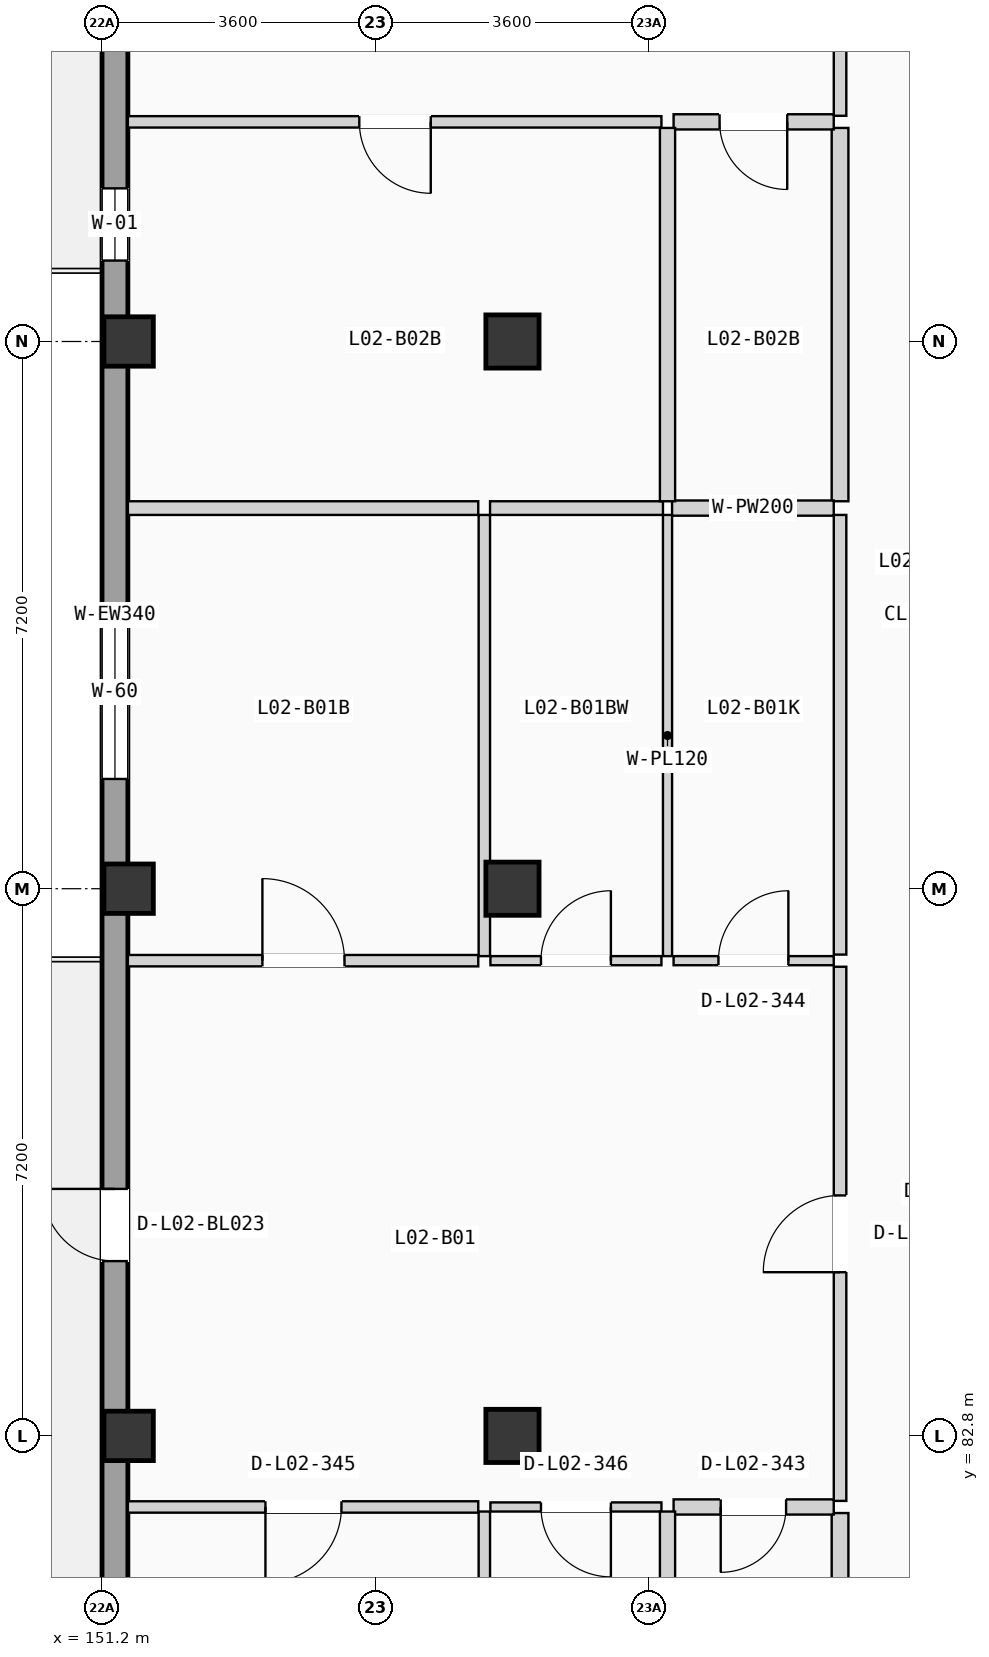
"""IFC4 building model, lengths in metres.
Left out: names, types, materials, properties, quantities, classifications, styles, units other than length and angle.
Written with IfcOpenShell. Run it as: python <this file> out.ifc"""

import sys

from ifc_helpers import new_model, si_unit, direction, frame, frame_2d, origin, origin_2d, place, context, subcontext, project, spatial, rectangle, extrude, element, fill, save


model = new_model("IFC4")
c1 = context("Model", 3, precision=1e-05, world=origin(), true_north=direction((0.0, 1.0)))
c2 = subcontext(c1, "Body", "Model", "MODEL_VIEW")
j1 = project(units=[si_unit("LENGTHUNIT", "METRE"), si_unit("PLANEANGLEUNIT", "RADIAN")], contexts=[c1])
p1 = place(None, origin())
s1 = spatial("IfcSite", under=j1, at=p1, CompositionType="ELEMENT")
p2 = place(p1, origin())
s2 = spatial("IfcBuilding", under=s1, at=p2, CompositionType="ELEMENT")
p3 = place(p2, frame((0.0, 0.0, 8.575)))
s3 = spatial("IfcBuildingStorey", under=s2, at=p3, CompositionType="ELEMENT", Elevation=8.575)
for number, where, z_axis, x_axis in (
    (1, (151.55, 82.8, 0.0), (0.0, 0.0, 1.0), (1.0, 0.0, 0.0)),
    (2, (151.55, 90.0, 0.0), (0.0, 0.0, 1.0), (1.0, 0.0, 0.0)),
    (3, (151.55, 97.2, 0.0), (0.0, 0.0, 1.0), (1.0, 0.0, 0.0)),
):
    element("IfcColumn", number, at=place(p3, frame(where, z_axis=z_axis, x_axis=x_axis)), inside=s3, PredefinedType="COLUMN", context=c2, shape_type="SweptSolid", body=[
        extrude(rectangle(XDim=0.65, YDim=0.65, at=origin_2d()), origin(), (0.0, 0.0, 1.0), 3.5),
    ])
for number, where, z_axis, x_axis in (
    (4, (156.6, 82.8, 0.0), (0.0, 0.0, 1.0), (1.0, 0.0, 0.0)),
    (5, (156.6, 90.0, 0.0), (0.0, 0.0, 1.0), (1.0, 0.0, 0.0)),
    (6, (156.6, 97.2, 0.0), (0.0, 0.0, 1.0), (1.0, 0.0, 0.0)),
):
    element("IfcColumn", number, at=place(p3, frame(where, z_axis=z_axis, x_axis=x_axis)), inside=s3, PredefinedType="COLUMN", context=c2, shape_type="SweptSolid", body=[
        extrude(rectangle(XDim=0.7, YDim=0.7, at=origin_2d()), origin(), (0.0, 0.0, 1.0), 3.5),
    ])
p4 = place(p3, frame((151.37, 68.74, 0.0), z_axis=(0.0, 0.0, 1.0), x_axis=(0.0, 1.0, 0.0)))
e7 = element("IfcWall", 7, at=p4, inside=s3, PredefinedType="SOLIDWALL", context=c2, shape_type="SweptSolid", body=[
    extrude(rectangle(XDim=49.72, YDim=0.34, at=frame_2d((24.86, 0.0))), origin(), (0.0, 0.0, 1.0), 3.24),
])
p5 = place(p4, frame((16.36, 0.0, 0.0)))
e8 = element("IfcOpeningElement", 8, at=p5, cuts=e7, PredefinedType="OPENING", context=c2, shape_type="SweptSolid", body=[
    extrude(rectangle(XDim=0.95, YDim=2.15, at=frame_2d((0.475, 1.075))), frame((0.0, 0.18, 0.0), z_axis=(0.0, -1.0, 0.0), x_axis=(1.0, 0.0, 0.0)), (0.0, 0.0, 1.0), 0.36),
])
p6 = place(p4, frame((9.002, 0.0, 0.9)))
e9 = element("IfcOpeningElement", 9, at=p6, cuts=e7, PredefinedType="OPENING", context=c2, shape_type="SweptSolid", body=[
    extrude(rectangle(XDim=2.3, YDim=1.65, at=frame_2d((1.15, 0.825))), frame((0.0, 0.18, 0.0), z_axis=(0.0, -1.0, 0.0), x_axis=(1.0, 0.0, 0.0)), (0.0, 0.0, 1.0), 0.36),
])
p7 = place(p4, frame((22.704, 0.0, 0.755)))
e10 = element("IfcOpeningElement", 10, at=p7, cuts=e7, PredefinedType="OPENING", context=c2, shape_type="SweptSolid", body=[
    extrude(rectangle(XDim=2.3, YDim=1.8, at=frame_2d((1.15, 0.9))), frame((0.0, 0.18, 0.0), z_axis=(0.0, -1.0, 0.0), x_axis=(1.0, 0.0, 0.0)), (0.0, 0.0, 1.0), 0.36),
])
p8 = place(p4, frame((32.455, 0.0, 0.0)))
e11 = element("IfcOpeningElement", 11, at=p8, cuts=e7, PredefinedType="OPENING", context=c2, shape_type="SweptSolid", body=[
    extrude(rectangle(XDim=1.08, YDim=2.18, at=frame_2d((0.54, 1.09))), frame((0.0, 0.18, 0.0), z_axis=(0.0, -1.0, 0.0), x_axis=(1.0, 0.0, 0.0)), (0.0, 0.0, 1.0), 0.36),
])
p9 = place(p4, frame((29.525, 0.0, 0.9)))
e12 = element("IfcOpeningElement", 12, at=p9, cuts=e7, PredefinedType="OPENING", context=c2, shape_type="SweptSolid", body=[
    extrude(rectangle(XDim=0.95, YDim=1.2, at=frame_2d((0.475, 0.6))), frame((0.0, 0.18, 0.0), z_axis=(0.0, -1.0, 0.0), x_axis=(1.0, 0.0, 0.0)), (0.0, 0.0, 1.0), 0.36),
])
p10 = place(p4, frame((39.529, 0.0, 0.9)))
e13 = element("IfcOpeningElement", 13, at=p10, cuts=e7, PredefinedType="OPENING", context=c2, shape_type="SweptSolid", body=[
    extrude(rectangle(XDim=0.95, YDim=1.35, at=frame_2d((0.475, 0.675))), frame((0.0, 0.18, 0.0), z_axis=(0.0, -1.0, 0.0), x_axis=(1.0, 0.0, 0.0)), (0.0, 0.0, 1.0), 0.36),
])
p11 = place(p3, frame((160.91, 81.945, 0.0), z_axis=(0.0, 0.0, 1.0), x_axis=(0.0, 1.0, 0.0)))
e14 = element("IfcWall", 14, at=p11, inside=s3, PredefinedType="PARTITIONING", context=c2, shape_type="SweptSolid", body=[
    extrude(rectangle(XDim=7.028, YDim=0.165, at=frame_2d((3.514, 0.0))), origin(), (0.0, 0.0, 1.0), 3.22),
])
p12 = place(p11, frame((3.009, 0.0, 0.0)))
e15 = element("IfcOpeningElement", 15, at=p12, cuts=e14, PredefinedType="OPENING", context=c2, shape_type="SweptSolid", body=[
    extrude(rectangle(XDim=1.01, YDim=2.11, at=frame_2d((0.505, 1.055))), frame((0.0, 0.093, 0.0), z_axis=(0.0, -1.0, 0.0), x_axis=(1.0, 0.0, 0.0)), (0.0, 0.0, 1.0), 0.185),
])
p13 = place(p3, frame((160.91, 76.0, 0.0), z_axis=(0.0, 0.0, 1.0), x_axis=(0.0, 1.0, 0.0)))
e16 = element("IfcWall", 16, at=p13, inside=s3, PredefinedType="PLUMBINGWALL", context=c2, shape_type="SweptSolid", body=[
    extrude(rectangle(XDim=5.785, YDim=0.22, at=frame_2d((2.893, 0.0))), origin(), (0.0, 0.0, 1.0), 3.22),
])
p14 = place(p3, frame((160.91, 89.133, 0.0), z_axis=(0.0, 0.0, 1.0), x_axis=(0.0, 1.0, 0.0)))
e17 = element("IfcWall", 17, at=p14, inside=s3, PredefinedType="PARTITIONING", context=c2, shape_type="SweptSolid", body=[
    extrude(rectangle(XDim=5.785, YDim=0.165, at=frame_2d((2.893, 0.0))), origin(), (0.0, 0.0, 1.0), 3.22),
])
p15 = place(p3, frame((160.91, 100.17, 0.0), z_axis=(0.0, 0.0, 1.0), x_axis=(0.0, 1.0, 0.0)))
e18 = element("IfcWall", 18, at=p15, inside=s3, PredefinedType="PARTITIONING", context=c2, shape_type="SweptSolid", body=[
    extrude(rectangle(XDim=5.958, YDim=0.165, at=frame_2d((2.979, 0.0))), origin(), (0.0, 0.0, 1.0), 3.22),
])
p16 = place(p15, frame((2.474, 0.0, 0.0)))
e19 = element("IfcOpeningElement", 19, at=p16, cuts=e18, PredefinedType="OPENING", context=c2, shape_type="SweptSolid", body=[
    extrude(rectangle(XDim=1.01, YDim=2.11, at=frame_2d((0.505, 1.055))), frame((0.0, 0.093, 0.0), z_axis=(0.0, -1.0, 0.0), x_axis=(1.0, 0.0, 0.0)), (0.0, 0.0, 1.0), 0.185),
])
p17 = place(p3, frame((160.91, 95.098, 0.0), z_axis=(0.0, 0.0, 1.0), x_axis=(0.0, 1.0, 0.0)))
e20 = element("IfcWall", 20, at=p17, inside=s3, PredefinedType="PLUMBINGWALL", context=c2, shape_type="SweptSolid", body=[
    extrude(rectangle(XDim=4.912, YDim=0.22, at=frame_2d((2.456, 0.0))), origin(), (0.0, 0.0, 1.0), 3.22),
])
p18 = place(p3, frame((158.72, 81.865, 0.0), z_axis=(0.0, 0.0, 1.0), x_axis=(1.0, 0.0, 0.0)))
e21 = element("IfcWall", 21, at=p18, inside=s3, PredefinedType="PLUMBINGWALL", context=c2, shape_type="SweptSolid", body=[
    extrude(rectangle(XDim=2.107, YDim=0.2, at=frame_2d((1.053, 0.0))), origin(), (0.0, 0.0, 1.0), 3.22),
])
p19 = place(p18, frame((0.62, 0.0, 0.0)))
e22 = element("IfcOpeningElement", 22, at=p19, cuts=e21, PredefinedType="OPENING", context=c2, shape_type="SweptSolid", body=[
    extrude(rectangle(XDim=0.86, YDim=2.0, at=frame_2d((0.43, 1.0))), frame((0.0, 0.11, 0.0), z_axis=(0.0, -1.0, 0.0), x_axis=(1.0, 0.0, 0.0)), (0.0, 0.0, 1.0), 0.22),
])
p20 = place(p3, frame((158.72, 89.053, 0.0), z_axis=(0.0, 0.0, 1.0), x_axis=(1.0, 0.0, 0.0)))
e23 = element("IfcWall", 23, at=p20, inside=s3, PredefinedType="PARTITIONING", context=c2, shape_type="SweptSolid", body=[
    extrude(rectangle(XDim=2.107, YDim=0.12, at=frame_2d((1.053, 0.0))), origin(), (0.0, 0.0, 1.0), 3.22),
])
p21 = place(p20, frame((0.59, 0.0, 0.0)))
e24 = element("IfcOpeningElement", 24, at=p21, cuts=e23, PredefinedType="OPENING", context=c2, shape_type="SweptSolid", body=[
    extrude(rectangle(XDim=0.92, YDim=2.02, at=frame_2d((0.46, 1.01))), frame((0.0, 0.07, 0.0), z_axis=(0.0, -1.0, 0.0), x_axis=(1.0, 0.0, 0.0)), (0.0, 0.0, 1.0), 0.14),
])
p22 = place(p3, frame((151.54, 81.865, 0.0), z_axis=(0.0, 0.0, 1.0), x_axis=(1.0, 0.0, 0.0)))
e25 = element("IfcWall", 25, at=p22, inside=s3, PredefinedType="PARTITIONING", context=c2, shape_type="SweptSolid", body=[
    extrude(rectangle(XDim=4.61, YDim=0.15, at=frame_2d((2.305, 0.0))), origin(), (0.0, 0.0, 1.0), 3.22),
])
p23 = place(p22, frame((1.81, 0.0, 0.0)))
e26 = element("IfcOpeningElement", 26, at=p23, cuts=e25, PredefinedType="OPENING", context=c2, shape_type="SweptSolid", body=[
    extrude(rectangle(XDim=1.0, YDim=2.06, at=frame_2d((0.5, 1.03))), frame((0.0, 0.085, 0.0), z_axis=(0.0, -1.0, 0.0), x_axis=(1.0, 0.0, 0.0)), (0.0, 0.0, 1.0), 0.17),
])
p24 = place(p3, frame((156.31, 81.865, 0.0), z_axis=(0.0, 0.0, 1.0), x_axis=(1.0, 0.0, 0.0)))
e27 = element("IfcWall", 27, at=p24, inside=s3, PredefinedType="PARTITIONING", context=c2, shape_type="SweptSolid", body=[
    extrude(rectangle(XDim=2.25, YDim=0.12, at=frame_2d((1.125, 0.0))), origin(), (0.0, 0.0, 1.0), 3.22),
])
p25 = place(p24, frame((0.665, 0.0, 0.0)))
e28 = element("IfcOpeningElement", 28, at=p25, cuts=e27, PredefinedType="OPENING", context=c2, shape_type="SweptSolid", body=[
    extrude(rectangle(XDim=0.92, YDim=2.02, at=frame_2d((0.46, 1.01))), frame((0.0, 0.07, 0.0), z_axis=(0.0, -1.0, 0.0), x_axis=(1.0, 0.0, 0.0)), (0.0, 0.0, 1.0), 0.14),
])
p26 = place(p3, frame((151.54, 89.053, 0.0), z_axis=(0.0, 0.0, 1.0), x_axis=(1.0, 0.0, 0.0)))
e29 = element("IfcWall", 29, at=p26, inside=s3, PredefinedType="PARTITIONING", context=c2, shape_type="SweptSolid", body=[
    extrude(rectangle(XDim=4.61, YDim=0.15, at=frame_2d((2.305, 0.0))), origin(), (0.0, 0.0, 1.0), 3.22),
])
p27 = place(p26, frame((1.77, 0.0, 0.0)))
e30 = element("IfcOpeningElement", 30, at=p27, cuts=e29, PredefinedType="OPENING", context=c2, shape_type="SweptSolid", body=[
    extrude(rectangle(XDim=1.08, YDim=2.1, at=frame_2d((0.54, 1.05))), frame((0.0, 0.085, 0.0), z_axis=(0.0, -1.0, 0.0), x_axis=(1.0, 0.0, 0.0)), (0.0, 0.0, 1.0), 0.17),
])
p28 = place(p3, frame((156.31, 89.053, 0.0), z_axis=(0.0, 0.0, 1.0), x_axis=(1.0, 0.0, 0.0)))
e31 = element("IfcWall", 31, at=p28, inside=s3, PredefinedType="PARTITIONING", context=c2, shape_type="SweptSolid", body=[
    extrude(rectangle(XDim=2.25, YDim=0.12, at=frame_2d((1.125, 0.0))), origin(), (0.0, 0.0, 1.0), 3.22),
])
p29 = place(p28, frame((0.665, 0.0, 0.0)))
e32 = element("IfcOpeningElement", 32, at=p29, cuts=e31, PredefinedType="OPENING", context=c2, shape_type="SweptSolid", body=[
    extrude(rectangle(XDim=0.92, YDim=2.02, at=frame_2d((0.46, 1.01))), frame((0.0, 0.07, 0.0), z_axis=(0.0, -1.0, 0.0), x_axis=(1.0, 0.0, 0.0)), (0.0, 0.0, 1.0), 0.14),
])
p30 = place(p3, frame((158.64, 76.0, 0.0), z_axis=(0.0, 0.0, 1.0), x_axis=(0.0, 1.0, 0.0)))
e33 = element("IfcWall", 33, at=p30, inside=s3, PredefinedType="PLUMBINGWALL", context=c2, shape_type="SweptSolid", body=[
    extrude(rectangle(XDim=5.805, YDim=0.2, at=frame_2d((2.902, 0.0))), origin(), (0.0, 0.0, 1.0), 3.22),
])
p31 = place(p30, frame((2.467, 0.0, 0.0)))
e34 = element("IfcOpeningElement", 34, at=p31, cuts=e33, PredefinedType="OPENING", context=c2, shape_type="SweptSolid", body=[
    extrude(rectangle(XDim=0.85, YDim=2.01, at=frame_2d((0.425, 1.005))), frame((0.0, 0.11, 0.0), z_axis=(0.0, -1.0, 0.0), x_axis=(1.0, 0.0, 0.0)), (0.0, 0.0, 1.0), 0.22),
])
p32 = place(p3, frame((158.64, 89.113, 0.0), z_axis=(0.0, 0.0, 1.0), x_axis=(0.0, 1.0, 0.0)))
e35 = element("IfcWall", 35, at=p32, inside=s3, PredefinedType="PARTITIONING", context=c2, shape_type="SweptSolid", body=[
    extrude(rectangle(XDim=5.805, YDim=0.12, at=frame_2d((2.902, 0.0))), origin(), (0.0, 0.0, 1.0), 3.22),
])
p33 = place(p3, frame((158.7, 95.008, 0.0), z_axis=(0.0, 0.0, 1.0), x_axis=(1.0, 0.0, 0.0)))
e36 = element("IfcWall", 36, at=p33, inside=s3, PredefinedType="PLUMBINGWALL", context=c2, shape_type="SweptSolid", body=[
    extrude(rectangle(XDim=2.127, YDim=0.2, at=frame_2d((1.063, 0.0))), origin(), (0.0, 0.0, 1.0), 3.22),
])
for number, where, z_axis, x_axis in (
    (37, (156.23, 76.0, 0.0), (0.0, 0.0, 1.0), (0.0, 1.0, 0.0)),
    (38, (156.23, 89.113, 0.0), (0.0, 0.0, 1.0), (0.0, 1.0, 0.0)),
):
    element("IfcWall", number, at=place(p3, frame(where, z_axis=z_axis, x_axis=x_axis)), inside=s3, PredefinedType="PARTITIONING", context=c2, shape_type="SweptSolid", body=[
        extrude(rectangle(XDim=5.805, YDim=0.15, at=frame_2d((2.902, 0.0))), origin(), (0.0, 0.0, 1.0), 3.22),
    ])
p34 = place(p3, frame((151.54, 95.008, 0.0), z_axis=(0.0, 0.0, 1.0), x_axis=(1.0, 0.0, 0.0)))
e39 = element("IfcWall", 39, at=p34, inside=s3, PredefinedType="PARTITIONING", context=c2, shape_type="SweptSolid", body=[
    extrude(rectangle(XDim=4.61, YDim=0.18, at=frame_2d((2.305, 0.0))), origin(), (0.0, 0.0, 1.0), 3.22),
])
p35 = place(p3, frame((156.305, 95.008, 0.0), z_axis=(0.0, 0.0, 1.0), x_axis=(1.0, 0.0, 0.0)))
e40 = element("IfcWall", 40, at=p35, inside=s3, PredefinedType="PARTITIONING", context=c2, shape_type="SweptSolid", body=[
    extrude(rectangle(XDim=2.275, YDim=0.18, at=frame_2d((1.138, 0.0))), origin(), (0.0, 0.0, 1.0), 3.22),
])
p36 = place(p3, frame((158.72, 100.09, 0.0), z_axis=(0.0, 0.0, 1.0), x_axis=(1.0, 0.0, 0.0)))
e41 = element("IfcWall", 41, at=p36, inside=s3, PredefinedType="PLUMBINGWALL", context=c2, shape_type="SweptSolid", body=[
    extrude(rectangle(XDim=2.107, YDim=0.2, at=frame_2d((1.053, 0.0))), origin(), (0.0, 0.0, 1.0), 3.22),
])
p37 = place(p36, frame((0.605, 0.0, 0.0)))
e42 = element("IfcOpeningElement", 42, at=p37, cuts=e41, PredefinedType="OPENING", context=c2, shape_type="SweptSolid", body=[
    extrude(rectangle(XDim=0.89, YDim=2.03, at=frame_2d((0.445, 1.015))), frame((0.0, 0.11, 0.0), z_axis=(0.0, -1.0, 0.0), x_axis=(1.0, 0.0, 0.0)), (0.0, 0.0, 1.0), 0.22),
])
p38 = place(p3, frame((151.54, 100.09, 0.0), z_axis=(0.0, 0.0, 1.0), x_axis=(1.0, 0.0, 0.0)))
e43 = element("IfcWall", 43, at=p38, inside=s3, PredefinedType="PARTITIONING", context=c2, shape_type="SweptSolid", body=[
    extrude(rectangle(XDim=7.02, YDim=0.15, at=frame_2d((3.51, 0.0))), origin(), (0.0, 0.0, 1.0), 3.22),
])
p39 = place(p38, frame((3.045, 0.0, 0.0)))
e44 = element("IfcOpeningElement", 44, at=p39, cuts=e43, PredefinedType="OPENING", context=c2, shape_type="SweptSolid", body=[
    extrude(rectangle(XDim=0.94, YDim=2.06, at=frame_2d((0.47, 1.03))), frame((0.0, 0.085, 0.0), z_axis=(0.0, -1.0, 0.0), x_axis=(1.0, 0.0, 0.0)), (0.0, 0.0, 1.0), 0.17),
])
p40 = place(p3, frame((158.64, 95.098, 0.0), z_axis=(0.0, 0.0, 1.0), x_axis=(0.0, 1.0, 0.0)))
e45 = element("IfcWall", 45, at=p40, inside=s3, PredefinedType="PLUMBINGWALL", context=c2, shape_type="SweptSolid", body=[
    extrude(rectangle(XDim=4.912, YDim=0.2, at=frame_2d((2.456, 0.0))), origin(), (0.0, 0.0, 1.0), 3.22),
])
p41 = place(p5, origin())
e46 = element("IfcDoor", 46, at=p41, inside=s3, OperationType="SINGLE_SWING_RIGHT", PredefinedType="DOOR", context=c2, shape_type="SweptSolid", body=[
    extrude(rectangle(XDim=0.95, YDim=2.15, at=frame_2d((0.475, 1.075))), frame((0.0, 0.025, 0.0), z_axis=(0.0, -1.0, 0.0), x_axis=(1.0, 0.0, 0.0)), (0.0, 0.0, 1.0), 0.05),
])
fill(e8, e46)
p42 = place(p7, origin())
e47 = element("IfcWindow", 47, at=p42, inside=s3, PartitioningType="DOUBLE_PANEL_VERTICAL", PredefinedType="WINDOW", context=c2, shape_type="SweptSolid", body=[
    extrude(rectangle(XDim=2.3, YDim=1.8, at=frame_2d((1.15, 0.9))), frame((0.0, 0.03, 0.0), z_axis=(0.0, -1.0, 0.0), x_axis=(1.0, 0.0, 0.0)), (0.0, 0.0, 1.0), 0.06),
])
fill(e10, e47)
p43 = place(p9, origin())
e48 = element("IfcWindow", 48, at=p43, inside=s3, PartitioningType="SINGLE_PANEL", PredefinedType="WINDOW", context=c2, shape_type="SweptSolid", body=[
    extrude(rectangle(XDim=0.95, YDim=1.2, at=frame_2d((0.475, 0.6))), frame((0.0, 0.03, 0.0), z_axis=(0.0, -1.0, 0.0), x_axis=(1.0, 0.0, 0.0)), (0.0, 0.0, 1.0), 0.06),
])
fill(e12, e48)
p44 = place(p12, origin())
e49 = element("IfcDoor", 49, at=p44, inside=s3, OperationType="SINGLE_SWING_LEFT", PredefinedType="DOOR", context=c2, shape_type="SweptSolid", body=[
    extrude(rectangle(XDim=1.01, YDim=2.11, at=frame_2d((0.505, 1.055))), frame((0.0, 0.025, 0.0), z_axis=(0.0, -1.0, 0.0), x_axis=(1.0, 0.0, 0.0)), (0.0, 0.0, 1.0), 0.05),
])
fill(e15, e49)
p45 = place(p19, frame((0.86, 0.0, 0.0), z_axis=(0.0, 0.0, 1.0), x_axis=(-1.0, 0.0, 0.0)))
e50 = element("IfcDoor", 50, at=p45, inside=s3, OperationType="SINGLE_SWING_LEFT", PredefinedType="DOOR", context=c2, shape_type="SweptSolid", body=[
    extrude(rectangle(XDim=0.86, YDim=2.0, at=frame_2d((0.43, 1.0))), frame((0.0, 0.025, 0.0), z_axis=(0.0, -1.0, 0.0), x_axis=(1.0, 0.0, 0.0)), (0.0, 0.0, 1.0), 0.05),
])
fill(e22, e50)
p46 = place(p21, origin())
e51 = element("IfcDoor", 51, at=p46, inside=s3, OperationType="SINGLE_SWING_RIGHT", PredefinedType="DOOR", context=c2, shape_type="SweptSolid", body=[
    extrude(rectangle(XDim=0.92, YDim=2.02, at=frame_2d((0.46, 1.01))), frame((0.0, 0.025, 0.0), z_axis=(0.0, -1.0, 0.0), x_axis=(1.0, 0.0, 0.0)), (0.0, 0.0, 1.0), 0.05),
])
fill(e24, e51)
p47 = place(p23, frame((1.0, 0.0, 0.0), z_axis=(0.0, 0.0, 1.0), x_axis=(-1.0, 0.0, 0.0)))
e52 = element("IfcDoor", 52, at=p47, inside=s3, OperationType="SINGLE_SWING_LEFT", PredefinedType="DOOR", context=c2, shape_type="SweptSolid", body=[
    extrude(rectangle(XDim=1.0, YDim=2.06, at=frame_2d((0.5, 1.03))), frame((0.0, 0.025, 0.0), z_axis=(0.0, -1.0, 0.0), x_axis=(1.0, 0.0, 0.0)), (0.0, 0.0, 1.0), 0.05),
])
fill(e26, e52)
p48 = place(p25, frame((0.92, 0.0, 0.0), z_axis=(0.0, 0.0, 1.0), x_axis=(-1.0, 0.0, 0.0)))
e53 = element("IfcDoor", 53, at=p48, inside=s3, OperationType="SINGLE_SWING_RIGHT", PredefinedType="DOOR", context=c2, shape_type="SweptSolid", body=[
    extrude(rectangle(XDim=0.92, YDim=2.02, at=frame_2d((0.46, 1.01))), frame((0.0, 0.025, 0.0), z_axis=(0.0, -1.0, 0.0), x_axis=(1.0, 0.0, 0.0)), (0.0, 0.0, 1.0), 0.05),
])
fill(e28, e53)
p49 = place(p27, origin())
e54 = element("IfcDoor", 54, at=p49, inside=s3, OperationType="SINGLE_SWING_LEFT", PredefinedType="DOOR", context=c2, shape_type="SweptSolid", body=[
    extrude(rectangle(XDim=1.08, YDim=2.1, at=frame_2d((0.54, 1.05))), frame((0.0, 0.025, 0.0), z_axis=(0.0, -1.0, 0.0), x_axis=(1.0, 0.0, 0.0)), (0.0, 0.0, 1.0), 0.05),
])
fill(e30, e54)
p50 = place(p29, origin())
e55 = element("IfcDoor", 55, at=p50, inside=s3, OperationType="SINGLE_SWING_RIGHT", PredefinedType="DOOR", context=c2, shape_type="SweptSolid", body=[
    extrude(rectangle(XDim=0.92, YDim=2.02, at=frame_2d((0.46, 1.01))), frame((0.0, 0.025, 0.0), z_axis=(0.0, -1.0, 0.0), x_axis=(1.0, 0.0, 0.0)), (0.0, 0.0, 1.0), 0.05),
])
fill(e32, e55)
p51 = place(p37, frame((0.89, 0.0, 0.0), z_axis=(0.0, 0.0, 1.0), x_axis=(-1.0, 0.0, 0.0)))
e56 = element("IfcDoor", 56, at=p51, inside=s3, OperationType="SINGLE_SWING_RIGHT", PredefinedType="DOOR", context=c2, shape_type="SweptSolid", body=[
    extrude(rectangle(XDim=0.89, YDim=2.03, at=frame_2d((0.445, 1.015))), frame((0.0, 0.025, 0.0), z_axis=(0.0, -1.0, 0.0), x_axis=(1.0, 0.0, 0.0)), (0.0, 0.0, 1.0), 0.05),
])
fill(e42, e56)
p52 = place(p39, frame((0.94, 0.0, 0.0), z_axis=(0.0, 0.0, 1.0), x_axis=(-1.0, 0.0, 0.0)))
e57 = element("IfcDoor", 57, at=p52, inside=s3, OperationType="SINGLE_SWING_RIGHT", PredefinedType="DOOR", context=c2, shape_type="SweptSolid", body=[
    extrude(rectangle(XDim=0.94, YDim=2.06, at=frame_2d((0.47, 1.03))), frame((0.0, 0.025, 0.0), z_axis=(0.0, -1.0, 0.0), x_axis=(1.0, 0.0, 0.0)), (0.0, 0.0, 1.0), 0.05),
])
fill(e44, e57)
save(model, sys.argv[1])
